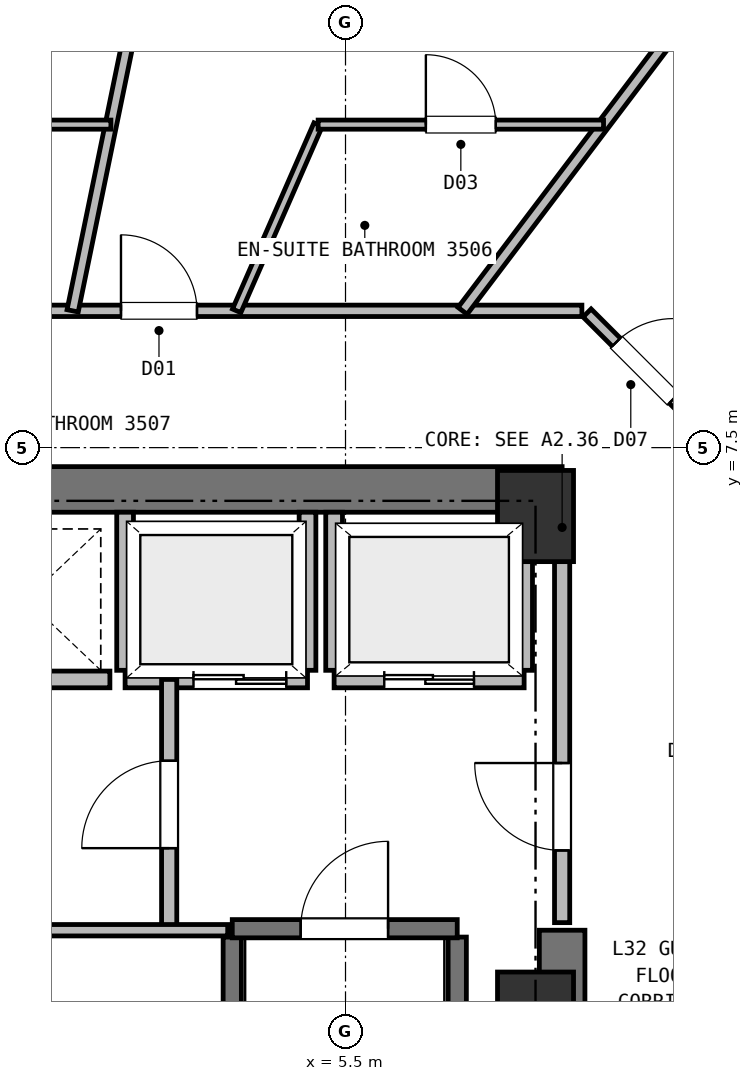
"""IFC4 building model, lengths in metres.
Left out: names, types, materials, properties, quantities, classifications, styles, units other than length and angle.
Written with IfcOpenShell. Run it as: python <this file> out.ifc"""

import sys

from ifc_helpers import new_model, si_unit, direction, frame, frame_2d, origin, origin_2d, place, context, subcontext, project, spatial, rectangle, extrude, element, fill, save


model = new_model("IFC4")
c1 = context("Model", 3, precision=1e-05, world=origin(), true_north=direction((0.0, 1.0)))
c2 = subcontext(c1, "Body", "Model", "MODEL_VIEW")
j1 = project(units=[si_unit("LENGTHUNIT", "METRE"), si_unit("PLANEANGLEUNIT", "RADIAN")], contexts=[c1])
p1 = place(None, origin())
s1 = spatial("IfcSite", under=j1, at=p1, CompositionType="ELEMENT")
p2 = place(p1, origin())
s2 = spatial("IfcBuilding", under=s1, at=p2, CompositionType="ELEMENT")
p3 = place(p2, frame((0.0, 0.0, 131.0)))
s3 = spatial("IfcBuildingStorey", under=s2, at=p3, CompositionType="ELEMENT", Elevation=131.0)
for number, where, z_axis, x_axis in (
    (1, (8.0, 0.0, 0.0), (0.0, 0.0, 1.0), (1.0, 0.0, 0.0)),
    (2, (8.0, 6.6, 0.0), (0.0, 0.0, 1.0), (1.0, 0.0, 0.0)),
):
    element("IfcColumn", number, at=place(p3, frame(where, z_axis=z_axis, x_axis=x_axis)), inside=s3, PredefinedType="COLUMN", context=c2, shape_type="SweptSolid", body=[
        extrude(rectangle(XDim=1.0, YDim=1.2, at=origin_2d()), origin(), (0.0, 0.0, 1.0), 3.75),
    ])
p4 = place(p3, frame((-8.35, 6.95, 0.0), z_axis=(0.0, 0.0, 1.0), x_axis=(1.0, 0.0, 0.0)))
e3 = element("IfcWall", 3, at=p4, inside=s3, PredefinedType="SHEAR", context=c2, shape_type="SweptSolid", body=[
    extrude(rectangle(XDim=16.7, YDim=0.6, at=frame_2d((8.35, 0.0))), origin(), (0.0, 0.0, 1.0), 3.5),
])
p5 = place(p3, frame((8.35, -6.95, 0.0), z_axis=(0.0, 0.0, 1.0), x_axis=(0.0, 1.0, 0.0)))
e4 = element("IfcWall", 4, at=p5, inside=s3, PredefinedType="SHEAR", context=c2, shape_type="SweptSolid", body=[
    extrude(rectangle(XDim=8.1, YDim=0.6, at=frame_2d((4.05, 0.0))), origin(), (0.0, 0.0, 1.0), 3.5),
])
for number, where, z_axis, x_axis in (
    (5, (4.01, -6.16, 0.0), (0.0, 0.0, 1.0), (0.0, 1.0, 0.0)),
    (6, (6.97, -6.16, 0.0), (0.0, 0.0, 1.0), (0.0, 1.0, 0.0)),
):
    element("IfcWall", number, at=place(p3, frame(where, z_axis=z_axis, x_axis=x_axis)), inside=s3, PredefinedType="SHEAR", context=c2, shape_type="SweptSolid", body=[
        extrude(rectangle(XDim=7.22, YDim=0.24, at=frame_2d((3.61, 0.0))), origin(), (0.0, 0.0, 1.0), 3.5),
    ])
p6 = place(p3, frame((4.01, 1.17, 0.0), z_axis=(0.0, 0.0, 1.0), x_axis=(1.0, 0.0, 0.0)))
e7 = element("IfcWall", 7, at=p6, inside=s3, PredefinedType="SHEAR", context=c2, shape_type="SweptSolid", body=[
    extrude(rectangle(XDim=2.96, YDim=0.24, at=frame_2d((1.48, 0.0))), origin(), (0.0, 0.0, 1.0), 3.5),
])
p7 = place(p6, frame((0.9, 0.0, 0.0)))
e8 = element("IfcOpeningElement", 8, at=p7, cuts=e7, PredefinedType="OPENING", context=c2, shape_type="SweptSolid", body=[
    extrude(rectangle(XDim=1.15, YDim=2.15, at=frame_2d((0.575, 1.075))), frame((0.0, 0.13, 0.0), z_axis=(0.0, -1.0, 0.0), x_axis=(1.0, 0.0, 0.0)), (0.0, 0.0, 1.0), 0.26),
])
p8 = place(p3, frame((5.35, 4.45, 0.0), z_axis=(0.0, 0.0, 1.0), x_axis=(1.0, 0.0, 0.0)))
e9 = element("IfcWall", 9, at=p8, inside=s3, PredefinedType="PARTITIONING", context=c2, shape_type="SweptSolid", body=[
    extrude(rectangle(XDim=2.5, YDim=0.22, at=frame_2d((1.25, 0.0))), origin(), (0.0, 0.0, 1.0), 3.5),
])
p9 = place(p8, frame((0.66, 0.0, 0.0)))
e10 = element("IfcOpeningElement", 10, at=p9, cuts=e9, PredefinedType="OPENING", context=c2, shape_type="SweptSolid", body=[
    extrude(rectangle(XDim=1.18, YDim=2.15, at=frame_2d((0.59, 1.075))), frame((0.0, 0.12, 0.0), z_axis=(0.0, -1.0, 0.0), x_axis=(1.0, 0.0, 0.0)), (0.0, 0.0, 1.0), 0.24),
])
p10 = place(p3, frame((5.35, 4.57, 0.0), z_axis=(0.0, 0.0, 1.0), x_axis=(0.0, 1.0, 0.0)))
e11 = element("IfcWall", 11, at=p10, inside=s3, PredefinedType="PARTITIONING", context=c2, shape_type="SweptSolid", body=[
    extrude(rectangle(XDim=2.08, YDim=0.22, at=frame_2d((1.04, 0.0))), origin(), (0.0, 0.0, 1.0), 3.5),
])
p11 = place(p3, frame((7.85, 4.57, 0.0), z_axis=(0.0, 0.0, 1.0), x_axis=(0.0, 1.0, 0.0)))
e12 = element("IfcWall", 12, at=p11, inside=s3, PredefinedType="PARTITIONING", context=c2, shape_type="SweptSolid", body=[
    extrude(rectangle(XDim=2.08, YDim=0.22, at=frame_2d((1.04, 0.0))), origin(), (0.0, 0.0, 1.0), 3.12),
])
p12 = place(p3, frame((2.6, 4.45, 0.0), z_axis=(0.0, 0.0, 1.0), x_axis=(1.0, 0.0, 0.0)))
e13 = element("IfcWall", 13, at=p12, inside=s3, PredefinedType="PARTITIONING", context=c2, shape_type="SweptSolid", body=[
    extrude(rectangle(XDim=2.4, YDim=0.22, at=frame_2d((1.2, 0.0))), origin(), (0.0, 0.0, 1.0), 3.5),
])
p13 = place(p12, frame((0.9, 0.0, 0.0)))
e14 = element("IfcOpeningElement", 14, at=p13, cuts=e13, PredefinedType="OPENING", context=c2, shape_type="SweptSolid", body=[
    extrude(rectangle(XDim=1.22, YDim=2.15, at=frame_2d((0.61, 1.075))), frame((0.0, 0.12, 0.0), z_axis=(0.0, -1.0, 0.0), x_axis=(1.0, 0.0, 0.0)), (0.0, 0.0, 1.0), 0.24),
])
for number, where, z_axis, x_axis in (
    (15, (2.6, 4.57, 0.0), (0.0, 0.0, 1.0), (0.0, 1.0, 0.0)),
    (16, (5.0, 4.57, 0.0), (0.0, 0.0, 1.0), (0.0, 1.0, 0.0)),
):
    element("IfcWall", number, at=place(p3, frame(where, z_axis=z_axis, x_axis=x_axis)), inside=s3, PredefinedType="PARTITIONING", context=c2, shape_type="SweptSolid", body=[
        extrude(rectangle(XDim=2.08, YDim=0.22, at=frame_2d((1.04, 0.0))), origin(), (0.0, 0.0, 1.0), 3.5),
    ])
p14 = place(p3, frame((0.2, 4.45, 0.0), z_axis=(0.0, 0.0, 1.0), x_axis=(1.0, 0.0, 0.0)))
e17 = element("IfcWall", 17, at=p14, inside=s3, PredefinedType="PARTITIONING", context=c2, shape_type="SweptSolid", body=[
    extrude(rectangle(XDim=2.2, YDim=0.22, at=frame_2d((1.1, 0.0))), origin(), (0.0, 0.0, 1.0), 3.5),
])
p15 = place(p3, frame((3.18, 1.15, 0.0), z_axis=(0.0, 0.0, 1.0), x_axis=(0.0, 1.0, 0.0)))
e18 = element("IfcWall", 18, at=p15, inside=s3, PredefinedType="PARTITIONING", context=c2, shape_type="SweptSolid", body=[
    extrude(rectangle(XDim=3.3, YDim=0.2, at=frame_2d((1.65, 0.0))), origin(), (0.0, 0.0, 1.0), 3.5),
])
p16 = place(p15, frame((1.08, 0.0, 0.0)))
e19 = element("IfcOpeningElement", 19, at=p16, cuts=e18, PredefinedType="OPENING", context=c2, shape_type="SweptSolid", body=[
    extrude(rectangle(XDim=1.15, YDim=2.15, at=frame_2d((0.575, 1.075))), frame((0.0, 0.11, 0.0), z_axis=(0.0, -1.0, 0.0), x_axis=(1.0, 0.0, 0.0)), (0.0, 0.0, 1.0), 0.22),
])
p17 = place(p3, frame((8.35, 1.25, 0.0), z_axis=(0.0, 0.0, 1.0), x_axis=(0.0, 1.0, 0.0)))
e20 = element("IfcWall", 20, at=p17, inside=s3, PredefinedType="PARTITIONING", context=c2, shape_type="SweptSolid", body=[
    extrude(rectangle(XDim=5.3, YDim=0.2, at=frame_2d((2.65, 0.0))), origin(), (0.0, 0.0, 1.0), 3.5),
])
p18 = place(p17, frame((0.95, 0.0, 0.0)))
e21 = element("IfcOpeningElement", 21, at=p18, cuts=e20, PredefinedType="OPENING", context=c2, shape_type="SweptSolid", body=[
    extrude(rectangle(XDim=1.15, YDim=2.15, at=frame_2d((0.575, 1.075))), frame((0.0, 0.11, 0.0), z_axis=(0.0, -1.0, 0.0), x_axis=(1.0, 0.0, 0.0)), (0.0, 0.0, 1.0), 0.22),
])
p19 = place(p3, frame((3.95, 1.15, 0.0), z_axis=(0.0, 0.0, 1.0), x_axis=(-1.0, 0.0, 0.0)))
e22 = element("IfcWall", 22, at=p19, inside=s3, PredefinedType="PARTITIONING", context=c2, shape_type="SweptSolid", body=[
    extrude(rectangle(XDim=7.9, YDim=0.15, at=frame_2d((3.95, 0.0))), origin(), (0.0, 0.0, 1.0), 3.5),
])
p20 = place(p19, frame((3.49, 0.0, 0.0)))
e23 = element("IfcOpeningElement", 23, at=p20, cuts=e22, PredefinedType="OPENING", context=c2, shape_type="SweptSolid", body=[
    extrude(rectangle(XDim=0.92, YDim=2.05, at=frame_2d((0.46, 1.025))), frame((0.0, 0.085, 0.0), z_axis=(0.0, -1.0, 0.0), x_axis=(1.0, 0.0, 0.0)), (0.0, 0.0, 1.0), 0.17),
])
p21 = place(p3, frame((8.678, 9.272, 0.0), z_axis=(0.0, 0.0, 1.0), x_axis=(0.707106781187, -0.707106781187, 0.0)))
e24 = element("IfcWall", 24, at=p21, inside=s3, PredefinedType="PARTITIONING", context=c2, shape_type="SweptSolid", body=[
    extrude(rectangle(XDim=2.89, YDim=0.15, at=frame_2d((1.445, 0.0))), origin(), (0.0, 0.0, 1.0), 3.5),
])
p22 = place(p21, frame((0.543, 0.0, 0.0)))
e25 = element("IfcOpeningElement", 25, at=p22, cuts=e24, PredefinedType="OPENING", context=c2, shape_type="SweptSolid", body=[
    extrude(rectangle(XDim=1.06, YDim=2.15, at=frame_2d((0.53, 1.075))), frame((0.0, 0.085, 0.0), z_axis=(0.0, -1.0, 0.0), x_axis=(1.0, 0.0, 0.0)), (0.0, 0.0, 1.0), 0.17),
])
p23 = place(p3, frame((-8.61, 9.3, 0.0), z_axis=(0.0, 0.0, 1.0), x_axis=(1.0, 0.0, 0.0)))
e26 = element("IfcWall", 26, at=p23, inside=s3, PredefinedType="PARTITIONING", context=c2, shape_type="SweptSolid", body=[
    extrude(rectangle(XDim=17.22, YDim=0.15, at=frame_2d((8.61, 0.0))), origin(), (0.0, 0.0, 1.0), 3.5),
])
p24 = place(p23, frame((11.156, 0.0, 0.0)))
e27 = element("IfcOpeningElement", 27, at=p24, cuts=e26, PredefinedType="OPENING", context=c2, shape_type="SweptSolid", body=[
    extrude(rectangle(XDim=1.0, YDim=2.15, at=frame_2d((0.5, 1.075))), frame((0.0, 0.085, 0.0), z_axis=(0.0, -1.0, 0.0), x_axis=(1.0, 0.0, 0.0)), (0.0, 0.0, 1.0), 0.17),
])
p25 = place(p23, frame((6.799, 0.0, 0.0)))
e28 = element("IfcOpeningElement", 28, at=p25, cuts=e26, PredefinedType="OPENING", context=c2, shape_type="SweptSolid", body=[
    extrude(rectangle(XDim=1.06, YDim=2.15, at=frame_2d((0.53, 1.075))), frame((0.0, 0.085, 0.0), z_axis=(0.0, -1.0, 0.0), x_axis=(1.0, 0.0, 0.0)), (0.0, 0.0, 1.0), 0.17),
])
p26 = place(p23, frame((1.737, 0.0, 0.0)))
e29 = element("IfcOpeningElement", 29, at=p26, cuts=e26, PredefinedType="OPENING", context=c2, shape_type="SweptSolid", body=[
    extrude(rectangle(XDim=1.06, YDim=2.15, at=frame_2d((0.53, 1.075))), frame((0.0, 0.085, 0.0), z_axis=(0.0, -1.0, 0.0), x_axis=(1.0, 0.0, 0.0)), (0.0, 0.0, 1.0), 0.17),
])
p27 = place(p23, frame((8.48, 0.0, 0.0)))
e30 = element("IfcOpeningElement", 30, at=p27, cuts=e26, PredefinedType="OPENING", context=c2, shape_type="SweptSolid", body=[
    extrude(rectangle(XDim=1.0, YDim=2.15, at=frame_2d((0.5, 1.075))), frame((0.0, 0.085, 0.0), z_axis=(0.0, -1.0, 0.0), x_axis=(1.0, 0.0, 0.0)), (0.0, 0.0, 1.0), 0.17),
])
p28 = place(p3, frame((7.04, 9.3, 0.0), z_axis=(0.0, 0.0, 1.0), x_axis=(0.603561778398, 0.797316235667, 0.0)))
e31 = element("IfcWall", 31, at=p28, inside=s3, PredefinedType="PARTITIONING", context=c2, shape_type="SweptSolid", body=[
    extrude(rectangle(XDim=5.354, YDim=0.15, at=frame_2d((2.677, 0.0))), origin(), (0.0, 0.0, 1.0), 3.5),
])
p29 = place(p3, frame((4.068, 9.3, 0.0), z_axis=(0.0, 0.0, 1.0), x_axis=(0.400794887066, 0.916167811322, 0.0)))
e32 = element("IfcWall", 32, at=p29, inside=s3, PredefinedType="PARTITIONING", context=c2, shape_type="SweptSolid", body=[
    extrude(rectangle(XDim=2.674, YDim=0.12, at=frame_2d((1.337, 0.0))), origin(), (0.0, 0.0, 1.0), 3.5),
])
p30 = place(p3, frame((5.14, 11.75, 0.0), z_axis=(0.0, 0.0, 1.0), x_axis=(1.0, 0.0, 0.0)))
e33 = element("IfcWall", 33, at=p30, inside=s3, PredefinedType="PARTITIONING", context=c2, shape_type="SweptSolid", body=[
    extrude(rectangle(XDim=3.755, YDim=0.12, at=frame_2d((1.877, 0.0))), origin(), (0.0, 0.0, 1.0), 3.5),
])
p31 = place(p30, frame((1.417, 0.0, 0.0)))
e34 = element("IfcOpeningElement", 34, at=p31, cuts=e33, PredefinedType="OPENING", context=c2, shape_type="SweptSolid", body=[
    extrude(rectangle(XDim=0.92, YDim=2.1, at=frame_2d((0.46, 1.05))), frame((0.0, 0.07, 0.0), z_axis=(0.0, -1.0, 0.0), x_axis=(1.0, 0.0, 0.0)), (0.0, 0.0, 1.0), 0.14),
])
p32 = place(p3, frame((1.91, 9.3, 0.0), z_axis=(0.0, 0.0, 1.0), x_axis=(0.201190538841, 0.97955212576, 0.0)))
e35 = element("IfcWall", 35, at=p32, inside=s3, PredefinedType="PARTITIONING", context=c2, shape_type="SweptSolid", body=[
    extrude(rectangle(XDim=7.777, YDim=0.15, at=frame_2d((3.889, 0.0))), origin(), (0.0, 0.0, 1.0), 3.5),
])
p33 = place(p3, frame((-0.388, 11.75, 0.0), z_axis=(0.0, 0.0, 1.0), x_axis=(1.0, 0.0, 0.0)))
e36 = element("IfcWall", 36, at=p33, inside=s3, PredefinedType="PARTITIONING", context=c2, shape_type="SweptSolid", body=[
    extrude(rectangle(XDim=2.802, YDim=0.12, at=frame_2d((1.401, 0.0))), origin(), (0.0, 0.0, 1.0), 3.5),
])
p34 = place(p33, frame((0.941, 0.0, 0.0)))
e37 = element("IfcOpeningElement", 37, at=p34, cuts=e36, PredefinedType="OPENING", context=c2, shape_type="SweptSolid", body=[
    extrude(rectangle(XDim=0.92, YDim=2.1, at=frame_2d((0.46, 1.05))), frame((0.0, 0.07, 0.0), z_axis=(0.0, -1.0, 0.0), x_axis=(1.0, 0.0, 0.0)), (0.0, 0.0, 1.0), 0.14),
])
p35 = place(p7, origin())
e38 = element("IfcDoor", 38, at=p35, inside=s3, OperationType="SINGLE_SWING_RIGHT", PredefinedType="DOOR", context=c2, shape_type="SweptSolid", body=[
    extrude(rectangle(XDim=1.15, YDim=2.15, at=frame_2d((0.575, 1.075))), frame((0.0, 0.025, 0.0), z_axis=(0.0, -1.0, 0.0), x_axis=(1.0, 0.0, 0.0)), (0.0, 0.0, 1.0), 0.05),
])
fill(e8, e38)
p36 = place(p9, origin())
e39 = element("IfcDoor", 39, at=p36, inside=s3, OperationType="DOUBLE_DOOR_SLIDING", PredefinedType="DOOR", context=c2, shape_type="SweptSolid", body=[
    extrude(rectangle(XDim=1.18, YDim=2.15, at=frame_2d((0.59, 1.075))), frame((0.0, 0.025, 0.0), z_axis=(0.0, -1.0, 0.0), x_axis=(1.0, 0.0, 0.0)), (0.0, 0.0, 1.0), 0.05),
])
fill(e10, e39)
p37 = place(p13, origin())
e40 = element("IfcDoor", 40, at=p37, inside=s3, OperationType="DOUBLE_DOOR_SLIDING", PredefinedType="DOOR", context=c2, shape_type="SweptSolid", body=[
    extrude(rectangle(XDim=1.22, YDim=2.15, at=frame_2d((0.61, 1.075))), frame((0.0, 0.025, 0.0), z_axis=(0.0, -1.0, 0.0), x_axis=(1.0, 0.0, 0.0)), (0.0, 0.0, 1.0), 0.05),
])
fill(e14, e40)
p38 = place(p16, origin())
e41 = element("IfcDoor", 41, at=p38, inside=s3, OperationType="SINGLE_SWING_LEFT", PredefinedType="DOOR", context=c2, shape_type="SweptSolid", body=[
    extrude(rectangle(XDim=1.15, YDim=2.15, at=frame_2d((0.575, 1.075))), frame((0.0, 0.025, 0.0), z_axis=(0.0, -1.0, 0.0), x_axis=(1.0, 0.0, 0.0)), (0.0, 0.0, 1.0), 0.05),
])
fill(e19, e41)
p39 = place(p18, origin())
e42 = element("IfcDoor", 42, at=p39, inside=s3, OperationType="SINGLE_SWING_RIGHT", PredefinedType="DOOR", context=c2, shape_type="SweptSolid", body=[
    extrude(rectangle(XDim=1.15, YDim=2.15, at=frame_2d((0.575, 1.075))), frame((0.0, 0.025, 0.0), z_axis=(0.0, -1.0, 0.0), x_axis=(1.0, 0.0, 0.0)), (0.0, 0.0, 1.0), 0.05),
])
fill(e21, e42)
p40 = place(p31, origin())
e43 = element("IfcDoor", 43, at=p40, inside=s3, OperationType="SINGLE_SWING_LEFT", PredefinedType="DOOR", context=c2, shape_type="SweptSolid", body=[
    extrude(rectangle(XDim=0.92, YDim=2.1, at=frame_2d((0.46, 1.05))), frame((0.0, 0.025, 0.0), z_axis=(0.0, -1.0, 0.0), x_axis=(1.0, 0.0, 0.0)), (0.0, 0.0, 1.0), 0.05),
])
fill(e34, e43)
p41 = place(p24, origin())
e44 = element("IfcDoor", 44, at=p41, inside=s3, OperationType="SINGLE_SWING_LEFT", PredefinedType="DOOR", context=c2, shape_type="SweptSolid", body=[
    extrude(rectangle(XDim=1.0, YDim=2.15, at=frame_2d((0.5, 1.075))), frame((0.0, 0.025, 0.0), z_axis=(0.0, -1.0, 0.0), x_axis=(1.0, 0.0, 0.0)), (0.0, 0.0, 1.0), 0.05),
])
fill(e27, e44)
p42 = place(p22, origin())
e45 = element("IfcDoor", 45, at=p42, inside=s3, OperationType="SINGLE_SWING_RIGHT", PredefinedType="DOOR", context=c2, shape_type="SweptSolid", body=[
    extrude(rectangle(XDim=1.06, YDim=2.15, at=frame_2d((0.53, 1.075))), frame((0.0, 0.025, 0.0), z_axis=(0.0, -1.0, 0.0), x_axis=(1.0, 0.0, 0.0)), (0.0, 0.0, 1.0), 0.05),
])
fill(e25, e45)
save(model, sys.argv[1])
